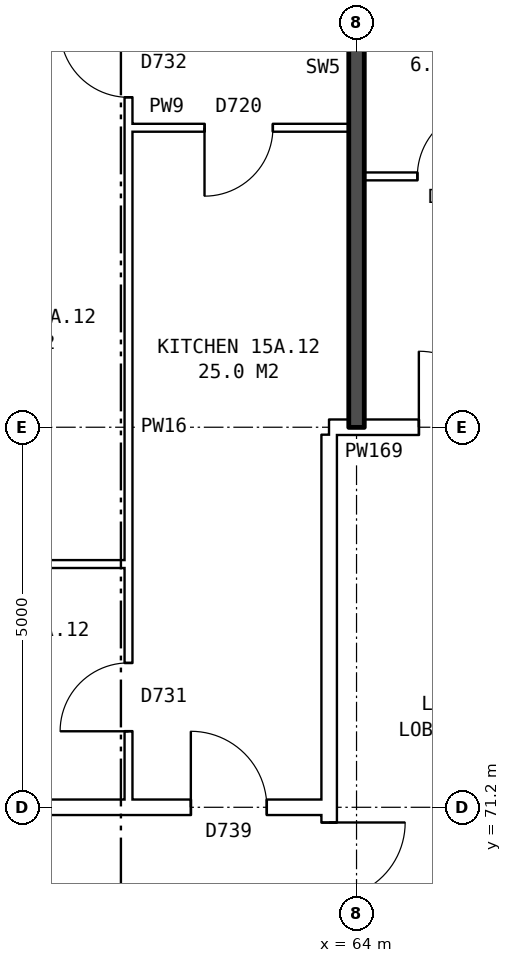
"""IFC4 building model, lengths in metres.
Left out: names, types, materials, properties, quantities, classifications, styles, units other than length and angle.
Written with IfcOpenShell. Run it as: python <this file> out.ifc"""

import sys

from ifc_helpers import new_model, si_unit, direction, frame, frame_2d, origin, place, context, subcontext, project, spatial, rectangle, extrude, element, fill, save


model = new_model("IFC4")
c1 = context("Model", 3, precision=1e-05, world=origin(), true_north=direction((0.0, 1.0)))
c2 = subcontext(c1, "Body", "Model", "MODEL_VIEW")
j1 = project(units=[si_unit("LENGTHUNIT", "METRE"), si_unit("PLANEANGLEUNIT", "RADIAN")], contexts=[c1])
p1 = place(None, origin())
s1 = spatial("IfcSite", under=j1, at=p1, CompositionType="ELEMENT")
p2 = place(p1, origin())
s2 = spatial("IfcBuilding", under=s1, at=p2, CompositionType="ELEMENT")
p3 = place(p2, frame((0.0, 0.0, 56.7)))
s3 = spatial("IfcBuildingStorey", under=s2, at=p3, CompositionType="ELEMENT", Elevation=56.7)
p4 = place(p3, frame((63.64, 63.9, 0.0), z_axis=(0.0, 0.0, 1.0), x_axis=(0.0, 1.0, 0.0)))
e1 = element("IfcWall", 1, at=p4, inside=s3, PredefinedType="PARTITIONING", context=c2, shape_type="SweptSolid", body=[
    extrude(rectangle(XDim=12.2, YDim=0.2, at=frame_2d((6.1, 0.0))), origin(), (0.0, 0.0, 1.0), 2.85),
])
p5 = place(p4, frame((5.1, 0.0, 0.0)))
e2 = element("IfcOpeningElement", 2, at=p5, cuts=e1, PredefinedType="OPENING", context=c2, shape_type="SweptSolid", body=[
    extrude(rectangle(XDim=2.0, YDim=2.1, at=frame_2d((1.0, 1.05))), frame((0.0, 0.11, 0.0), z_axis=(0.0, -1.0, 0.0), x_axis=(1.0, 0.0, 0.0)), (0.0, 0.0, 1.0), 0.22),
])
p6 = place(p3, frame((44.36, 71.2, 0.0), z_axis=(0.0, 0.0, 1.0), x_axis=(1.0, 0.0, 0.0)))
e3 = element("IfcWall", 3, at=p6, inside=s3, PredefinedType="PARTITIONING", context=c2, shape_type="SweptSolid", body=[
    extrude(rectangle(XDim=19.28, YDim=0.2, at=frame_2d((9.64, 0.0))), origin(), (0.0, 0.0, 1.0), 2.85),
])
p7 = place(p6, frame((17.46, 0.0, 0.0)))
e4 = element("IfcOpeningElement", 4, at=p7, cuts=e3, PredefinedType="OPENING", context=c2, shape_type="SweptSolid", body=[
    extrude(rectangle(XDim=1.0, YDim=2.1, at=frame_2d((0.5, 1.05))), frame((0.0, 0.11, 0.0), z_axis=(0.0, -1.0, 0.0), x_axis=(1.0, 0.0, 0.0)), (0.0, 0.0, 1.0), 0.22),
])
p8 = place(p6, frame((8.64, 0.0, 0.0)))
e5 = element("IfcOpeningElement", 5, at=p8, cuts=e3, PredefinedType="OPENING", context=c2, shape_type="SweptSolid", body=[
    extrude(rectangle(XDim=1.0, YDim=2.1, at=frame_2d((0.5, 1.05))), frame((0.0, 0.11, 0.0), z_axis=(0.0, -1.0, 0.0), x_axis=(1.0, 0.0, 0.0)), (0.0, 0.0, 1.0), 0.22),
])
p9 = place(p6, frame((5.64, 0.0, 0.0)))
e6 = element("IfcOpeningElement", 6, at=p9, cuts=e3, PredefinedType="OPENING", context=c2, shape_type="SweptSolid", body=[
    extrude(rectangle(XDim=1.0, YDim=2.1, at=frame_2d((0.5, 1.05))), frame((0.0, 0.11, 0.0), z_axis=(0.0, -1.0, 0.0), x_axis=(1.0, 0.0, 0.0)), (0.0, 0.0, 1.0), 0.22),
])
p10 = place(p3, frame((55.0, 74.4, 0.0), z_axis=(0.0, 0.0, 1.0), x_axis=(1.0, 0.0, 0.0)))
e7 = element("IfcWall", 7, at=p10, inside=s3, PredefinedType="PARTITIONING", context=c2, shape_type="SweptSolid", body=[
    extrude(rectangle(XDim=6.0, YDim=0.1, at=frame_2d((3.0, 0.0))), origin(), (0.0, 0.0, 1.0), 2.85),
])
p11 = place(p3, frame((63.64, 76.2, 0.0), z_axis=(0.0, 0.0, 1.0), x_axis=(1.0, 0.0, 0.0)))
e8 = element("IfcWall", 8, at=p11, inside=s3, PredefinedType="PARTITIONING", context=c2, shape_type="SweptSolid", body=[
    extrude(rectangle(XDim=3.0, YDim=0.2, at=frame_2d((1.5, 0.0))), origin(), (0.0, 0.0, 1.0), 2.85),
])
p12 = place(p11, frame((1.18, 0.0, 0.0)))
e9 = element("IfcOpeningElement", 9, at=p12, cuts=e8, PredefinedType="OPENING", context=c2, shape_type="SweptSolid", body=[
    extrude(rectangle(XDim=1.0, YDim=2.1, at=frame_2d((0.5, 1.05))), frame((0.0, 0.11, 0.0), z_axis=(0.0, -1.0, 0.0), x_axis=(1.0, 0.0, 0.0)), (0.0, 0.0, 1.0), 0.22),
])
p13 = place(p3, frame((64.1, 79.5, 0.0), z_axis=(0.0, 0.0, 1.0), x_axis=(1.0, 0.0, 0.0)))
e10 = element("IfcWall", 10, at=p13, inside=s3, PredefinedType="PARTITIONING", context=c2, shape_type="SweptSolid", body=[
    extrude(rectangle(XDim=5.8, YDim=0.1, at=frame_2d((2.9, 0.0))), origin(), (0.0, 0.0, 1.0), 2.85),
])
p14 = place(p13, frame((3.6, 0.0, 0.0)))
e11 = element("IfcOpeningElement", 11, at=p14, cuts=e10, PredefinedType="OPENING", context=c2, shape_type="SweptSolid", body=[
    extrude(rectangle(XDim=0.9, YDim=2.1, at=frame_2d((0.45, 1.05))), frame((0.0, 0.06, 0.0), z_axis=(0.0, -1.0, 0.0), x_axis=(1.0, 0.0, 0.0)), (0.0, 0.0, 1.0), 0.12),
])
p15 = place(p13, frame((0.7, 0.0, 0.0)))
e12 = element("IfcOpeningElement", 12, at=p15, cuts=e10, PredefinedType="OPENING", context=c2, shape_type="SweptSolid", body=[
    extrude(rectangle(XDim=0.9, YDim=2.1, at=frame_2d((0.45, 1.05))), frame((0.0, 0.06, 0.0), z_axis=(0.0, -1.0, 0.0), x_axis=(1.0, 0.0, 0.0)), (0.0, 0.0, 1.0), 0.12),
])
p16 = place(p3, frame((61.0, 80.14, 0.0), z_axis=(0.0, 0.0, 1.0), x_axis=(1.0, 0.0, 0.0)))
e13 = element("IfcWall", 13, at=p16, inside=s3, PredefinedType="PARTITIONING", context=c2, shape_type="SweptSolid", body=[
    extrude(rectangle(XDim=2.9, YDim=0.1, at=frame_2d((1.45, 0.0))), origin(), (0.0, 0.0, 1.0), 2.85),
])
p17 = place(p16, frame((1.0, 0.0, 0.0)))
e14 = element("IfcOpeningElement", 14, at=p17, cuts=e13, PredefinedType="OPENING", context=c2, shape_type="SweptSolid", body=[
    extrude(rectangle(XDim=0.9, YDim=2.1, at=frame_2d((0.45, 1.05))), frame((0.0, 0.06, 0.0), z_axis=(0.0, -1.0, 0.0), x_axis=(1.0, 0.0, 0.0)), (0.0, 0.0, 1.0), 0.12),
])
p18 = place(p3, frame((61.0, 71.3, 0.0), z_axis=(0.0, 0.0, 1.0), x_axis=(0.0, 1.0, 0.0)))
e15 = element("IfcWall", 15, at=p18, inside=s3, PredefinedType="PARTITIONING", context=c2, shape_type="SweptSolid", body=[
    extrude(rectangle(XDim=14.34, YDim=0.1, at=frame_2d((7.17, 0.0))), origin(), (0.0, 0.0, 1.0), 2.85),
])
p19 = place(p18, frame((9.24, 0.0, 0.0)))
e16 = element("IfcOpeningElement", 16, at=p19, cuts=e15, PredefinedType="OPENING", context=c2, shape_type="SweptSolid", body=[
    extrude(rectangle(XDim=0.9, YDim=2.1, at=frame_2d((0.45, 1.05))), frame((0.0, 0.06, 0.0), z_axis=(0.0, -1.0, 0.0), x_axis=(1.0, 0.0, 0.0)), (0.0, 0.0, 1.0), 0.12),
])
p20 = place(p18, frame((0.9, 0.0, 0.0)))
e17 = element("IfcOpeningElement", 17, at=p20, cuts=e15, PredefinedType="OPENING", context=c2, shape_type="SweptSolid", body=[
    extrude(rectangle(XDim=0.9, YDim=2.1, at=frame_2d((0.45, 1.05))), frame((0.0, 0.06, 0.0), z_axis=(0.0, -1.0, 0.0), x_axis=(1.0, 0.0, 0.0)), (0.0, 0.0, 1.0), 0.12),
])
p21 = place(p3, frame((64.0, 76.2, 0.0), z_axis=(0.0, 0.0, 1.0), x_axis=(0.0, 1.0, 0.0)))
e18 = element("IfcWall", 18, at=p21, inside=s3, PredefinedType="SOLIDWALL", context=c2, shape_type="SweptSolid", body=[
    extrude(rectangle(XDim=9.44, YDim=0.2, at=frame_2d((4.72, 0.0))), origin(), (0.0, 0.0, 1.0), 2.85),
])
p22 = place(p5, frame((2.0, 0.0, 0.0), z_axis=(0.0, 0.0, 1.0), x_axis=(-1.0, 0.0, 0.0)))
e19 = element("IfcDoor", 19, at=p22, inside=s3, OperationType="DOUBLE_DOOR_SINGLE_SWING", PredefinedType="DOOR", context=c2, shape_type="SweptSolid", body=[
    extrude(rectangle(XDim=2.0, YDim=2.1, at=frame_2d((1.0, 1.05))), frame((0.0, 0.025, 0.0), z_axis=(0.0, -1.0, 0.0), x_axis=(1.0, 0.0, 0.0)), (0.0, 0.0, 1.0), 0.05),
])
fill(e2, e19)
p23 = place(p12, origin())
e20 = element("IfcDoor", 20, at=p23, inside=s3, OperationType="SINGLE_SWING_LEFT", PredefinedType="DOOR", context=c2, shape_type="SweptSolid", body=[
    extrude(rectangle(XDim=1.0, YDim=2.1, at=frame_2d((0.5, 1.05))), frame((0.0, 0.025, 0.0), z_axis=(0.0, -1.0, 0.0), x_axis=(1.0, 0.0, 0.0)), (0.0, 0.0, 1.0), 0.05),
])
fill(e9, e20)
p24 = place(p15, origin())
e21 = element("IfcDoor", 21, at=p24, inside=s3, OperationType="SINGLE_SWING_RIGHT", PredefinedType="DOOR", context=c2, shape_type="SweptSolid", body=[
    extrude(rectangle(XDim=0.9, YDim=2.1, at=frame_2d((0.45, 1.05))), frame((0.0, 0.025, 0.0), z_axis=(0.0, -1.0, 0.0), x_axis=(1.0, 0.0, 0.0)), (0.0, 0.0, 1.0), 0.05),
])
fill(e12, e21)
p25 = place(p19, origin())
e22 = element("IfcDoor", 22, at=p25, inside=s3, OperationType="SINGLE_SWING_RIGHT", PredefinedType="DOOR", context=c2, shape_type="SweptSolid", body=[
    extrude(rectangle(XDim=0.9, YDim=2.1, at=frame_2d((0.45, 1.05))), frame((0.0, 0.025, 0.0), z_axis=(0.0, -1.0, 0.0), x_axis=(1.0, 0.0, 0.0)), (0.0, 0.0, 1.0), 0.05),
])
fill(e16, e22)
p26 = place(p7, origin())
e23 = element("IfcDoor", 23, at=p26, inside=s3, OperationType="SINGLE_SWING_LEFT", PredefinedType="DOOR", context=c2, shape_type="SweptSolid", body=[
    extrude(rectangle(XDim=1.0, YDim=2.1, at=frame_2d((0.5, 1.05))), frame((0.0, 0.025, 0.0), z_axis=(0.0, -1.0, 0.0), x_axis=(1.0, 0.0, 0.0)), (0.0, 0.0, 1.0), 0.05),
])
fill(e4, e23)
p27 = place(p17, frame((0.9, 0.0, 0.0), z_axis=(0.0, 0.0, 1.0), x_axis=(-1.0, 0.0, 0.0)))
e24 = element("IfcDoor", 24, at=p27, inside=s3, OperationType="SINGLE_SWING_RIGHT", PredefinedType="DOOR", context=c2, shape_type="SweptSolid", body=[
    extrude(rectangle(XDim=0.9, YDim=2.1, at=frame_2d((0.45, 1.05))), frame((0.0, 0.025, 0.0), z_axis=(0.0, -1.0, 0.0), x_axis=(1.0, 0.0, 0.0)), (0.0, 0.0, 1.0), 0.05),
])
fill(e14, e24)
p28 = place(p20, origin())
e25 = element("IfcDoor", 25, at=p28, inside=s3, OperationType="SINGLE_SWING_LEFT", PredefinedType="DOOR", context=c2, shape_type="SweptSolid", body=[
    extrude(rectangle(XDim=0.9, YDim=2.1, at=frame_2d((0.45, 1.05))), frame((0.0, 0.025, 0.0), z_axis=(0.0, -1.0, 0.0), x_axis=(1.0, 0.0, 0.0)), (0.0, 0.0, 1.0), 0.05),
])
fill(e17, e25)
save(model, sys.argv[1])
